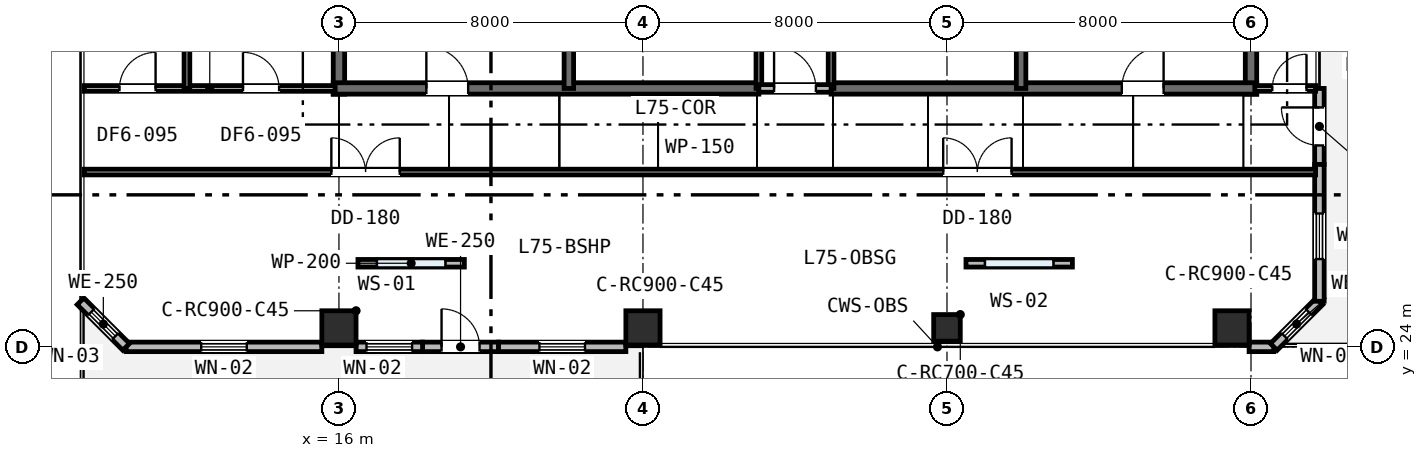
"""IFC4 building model, lengths in metres.
Left out: names, types, materials, properties, quantities, classifications, styles, units other than length and angle.
Written with IfcOpenShell. Run it as: python <this file> out.ifc"""

import sys

from ifc_helpers import new_model, si_unit, direction, frame, frame_2d, origin, origin_2d, place, context, subcontext, project, spatial, rectangle, extrude, element, fill, save


model = new_model("IFC4")
c1 = context("Model", 3, precision=1e-05, world=origin(), true_north=direction((0.0, 1.0)))
c2 = subcontext(c1, "Body", "Model", "MODEL_VIEW")
j1 = project(units=[si_unit("LENGTHUNIT", "METRE"), si_unit("PLANEANGLEUNIT", "RADIAN")], contexts=[c1])
p1 = place(None, origin())
s1 = spatial("IfcSite", under=j1, at=p1, CompositionType="ELEMENT")
p2 = place(p1, origin())
s2 = spatial("IfcBuilding", under=s1, at=p2, CompositionType="ELEMENT")
p3 = place(p2, frame((0.0, 0.0, 290.6)))
s3 = spatial("IfcBuildingStorey", under=s2, at=p3, CompositionType="ELEMENT", Elevation=290.6)
for number, where, z_axis, x_axis in (
    (1, (16.0, 30.65, 0.0), (0.0, 0.0, 1.0), (0.0, 1.0, 0.0)),
    (2, (40.0, 30.65, 0.0), (0.0, 0.0, 1.0), (0.0, 1.0, 0.0)),
):
    element("IfcWall", number, at=place(p3, frame(where, z_axis=z_axis, x_axis=x_axis)), inside=s3, PredefinedType="SHEAR", context=c2, shape_type="SweptSolid", body=[
        extrude(rectangle(XDim=12.3, YDim=0.3, at=frame_2d((6.15, 0.0))), origin(), (0.0, 0.0, 1.0), 5.2),
    ])
p4 = place(p3, frame((15.85, 30.8, 0.0), z_axis=(0.0, 0.0, 1.0), x_axis=(1.0, 0.0, 0.0)))
e3 = element("IfcWall", 3, at=p4, inside=s3, PredefinedType="SHEAR", context=c2, shape_type="SweptSolid", body=[
    extrude(rectangle(XDim=11.2, YDim=0.3, at=frame_2d((5.6, 0.0))), origin(), (0.0, 0.0, 1.0), 5.2),
])
p5 = place(p4, frame((2.45, 0.0, 0.0)))
e4 = element("IfcOpeningElement", 4, at=p5, cuts=e3, PredefinedType="OPENING", context=c2, shape_type="SweptSolid", body=[
    extrude(rectangle(XDim=1.1, YDim=2.15, at=frame_2d((0.55, 1.075))), frame((0.0, 0.16, 0.0), z_axis=(0.0, -1.0, 0.0), x_axis=(1.0, 0.0, 0.0)), (0.0, 0.0, 1.0), 0.32),
])
p6 = place(p3, frame((28.95, 30.8, 0.0), z_axis=(0.0, 0.0, 1.0), x_axis=(1.0, 0.0, 0.0)))
e5 = element("IfcWall", 5, at=p6, inside=s3, PredefinedType="SHEAR", context=c2, shape_type="SweptSolid", body=[
    extrude(rectangle(XDim=11.2, YDim=0.3, at=frame_2d((5.6, 0.0))), origin(), (0.0, 0.0, 1.0), 5.2),
])
p7 = place(p6, frame((7.65, 0.0, 0.0)))
e6 = element("IfcOpeningElement", 6, at=p7, cuts=e5, PredefinedType="OPENING", context=c2, shape_type="SweptSolid", body=[
    extrude(rectangle(XDim=1.1, YDim=2.15, at=frame_2d((0.55, 1.075))), frame((0.0, 0.16, 0.0), z_axis=(0.0, -1.0, 0.0), x_axis=(1.0, 0.0, 0.0)), (0.0, 0.0, 1.0), 0.32),
])
for number, where, z_axis, x_axis in (
    (7, (22.05, 30.8, 0.0), (0.0, 0.0, 1.0), (0.0, 1.0, 0.0)),
    (8, (33.95, 30.8, 0.0), (0.0, 0.0, 1.0), (0.0, 1.0, 0.0)),
):
    element("IfcWall", number, at=place(p3, frame(where, z_axis=z_axis, x_axis=x_axis)), inside=s3, PredefinedType="SHEAR", context=c2, shape_type="SweptSolid", body=[
        extrude(rectangle(XDim=6.45, YDim=0.25, at=frame_2d((3.225, 0.0))), origin(), (0.0, 0.0, 1.0), 5.2),
    ])
for number, where, z_axis, x_axis in (
    (9, (16.0, 24.5, 0.0), (0.0, 0.0, 1.0), (1.0, 0.0, 0.0)),
    (10, (24.0, 24.5, 0.0), (0.0, 0.0, 1.0), (1.0, 0.0, 0.0)),
):
    element("IfcColumn", number, at=place(p3, frame(where, z_axis=z_axis, x_axis=x_axis)), inside=s3, PredefinedType="COLUMN", context=c2, shape_type="SweptSolid", body=[
        extrude(rectangle(XDim=0.9, YDim=0.9, at=origin_2d()), origin(), (0.0, 0.0, 1.0), 5.2),
    ])
p8 = place(p3, frame((32.0, 24.5, 0.0), z_axis=(0.0, 0.0, 1.0), x_axis=(1.0, 0.0, 0.0)))
e11 = element("IfcColumn", 11, at=p8, inside=s3, PredefinedType="COLUMN", context=c2, shape_type="SweptSolid", body=[
    extrude(rectangle(XDim=0.7, YDim=0.7, at=origin_2d()), origin(), (0.0, 0.0, 1.0), 5.2),
])
p9 = place(p3, frame((39.5, 24.5, 0.0), z_axis=(0.0, 0.0, 1.0), x_axis=(1.0, 0.0, 0.0)))
e12 = element("IfcColumn", 12, at=p9, inside=s3, PredefinedType="COLUMN", context=c2, shape_type="SweptSolid", body=[
    extrude(rectangle(XDim=0.9, YDim=0.9, at=origin_2d()), origin(), (0.0, 0.0, 1.0), 5.2),
])
p10 = place(p3, frame((18.2, 24.0, 0.0), z_axis=(0.0, 0.0, 1.0), x_axis=(1.0, 0.0, 0.0)))
e13 = element("IfcWall", 13, at=p10, inside=s3, PredefinedType="STANDARD", context=c2, shape_type="SweptSolid", body=[
    extrude(rectangle(XDim=2.0, YDim=0.25, at=frame_2d((1.0, 0.0))), origin(), (0.0, 0.0, 1.0), 4.58),
])
p11 = place(p10, frame((0.5, 0.0, 0.0)))
e14 = element("IfcOpeningElement", 14, at=p11, cuts=e13, PredefinedType="OPENING", context=c2, shape_type="SweptSolid", body=[
    extrude(rectangle(XDim=1.0, YDim=2.15, at=frame_2d((0.5, 1.075))), frame((0.0, 0.135, 0.0), z_axis=(0.0, -1.0, 0.0), x_axis=(1.0, 0.0, 0.0)), (0.0, 0.0, 1.0), 0.27),
])
p12 = place(p3, frame((10.4, 24.0, 0.0), z_axis=(0.0, 0.0, 1.0), x_axis=(1.0, 0.0, 0.0)))
e15 = element("IfcWall", 15, at=p12, inside=s3, PredefinedType="STANDARD", context=c2, shape_type="SweptSolid", body=[
    extrude(rectangle(XDim=5.15, YDim=0.25, at=frame_2d((2.575, 0.0))), origin(), (0.0, 0.0, 1.0), 4.87),
])
p13 = place(p12, frame((1.975, 0.0, 0.85)))
e16 = element("IfcOpeningElement", 16, at=p13, cuts=e15, PredefinedType="OPENING", context=c2, shape_type="SweptSolid", body=[
    extrude(rectangle(XDim=1.2, YDim=1.6, at=frame_2d((0.6, 0.8))), frame((0.0, 0.135, 0.0), z_axis=(0.0, -1.0, 0.0), x_axis=(1.0, 0.0, 0.0)), (0.0, 0.0, 1.0), 0.27),
])
p14 = place(p3, frame((16.45, 24.0, 0.0), z_axis=(0.0, 0.0, 1.0), x_axis=(1.0, 0.0, 0.0)))
e17 = element("IfcWall", 17, at=p14, inside=s3, PredefinedType="STANDARD", context=c2, shape_type="SweptSolid", body=[
    extrude(rectangle(XDim=1.75, YDim=0.25, at=frame_2d((0.875, 0.0))), origin(), (0.0, 0.0, 1.0), 4.58),
])
p15 = place(p14, frame((0.275, 0.0, 0.85)))
e18 = element("IfcOpeningElement", 18, at=p15, cuts=e17, PredefinedType="OPENING", context=c2, shape_type="SweptSolid", body=[
    extrude(rectangle(XDim=1.2, YDim=1.6, at=frame_2d((0.6, 0.8))), frame((0.0, 0.135, 0.0), z_axis=(0.0, -1.0, 0.0), x_axis=(1.0, 0.0, 0.0)), (0.0, 0.0, 1.0), 0.27),
])
p16 = place(p3, frame((20.2, 24.0, 0.0), z_axis=(0.0, 0.0, 1.0), x_axis=(1.0, 0.0, 0.0)))
e19 = element("IfcWall", 19, at=p16, inside=s3, PredefinedType="STANDARD", context=c2, shape_type="SweptSolid", body=[
    extrude(rectangle(XDim=3.35, YDim=0.25, at=frame_2d((1.675, 0.0))), origin(), (0.0, 0.0, 1.0), 4.58),
])
p17 = place(p16, frame((1.075, 0.0, 0.85)))
e20 = element("IfcOpeningElement", 20, at=p17, cuts=e19, PredefinedType="OPENING", context=c2, shape_type="SweptSolid", body=[
    extrude(rectangle(XDim=1.2, YDim=1.6, at=frame_2d((0.6, 0.8))), frame((0.0, 0.135, 0.0), z_axis=(0.0, -1.0, 0.0), x_axis=(1.0, 0.0, 0.0)), (0.0, 0.0, 1.0), 0.27),
])
p18 = place(p3, frame((39.95, 24.0, 0.0), z_axis=(0.0, 0.0, 1.0), x_axis=(1.0, 0.0, 0.0)))
e21 = element("IfcWall", 21, at=p18, inside=s3, PredefinedType="STANDARD", context=c2, shape_type="SweptSolid", body=[
    extrude(rectangle(XDim=0.65, YDim=0.25, at=frame_2d((0.325, 0.0))), origin(), (0.0, 0.0, 1.0), 4.87),
])
p19 = place(p3, frame((40.6, 24.0, 0.0), z_axis=(0.0, 0.0, 1.0), x_axis=(0.707106781187, 0.707106781187, 0.0)))
e22 = element("IfcWall", 22, at=p19, inside=s3, PredefinedType="STANDARD", context=c2, shape_type="SweptSolid", body=[
    extrude(rectangle(XDim=1.697, YDim=0.25, at=frame_2d((0.849, 0.0))), origin(), (0.0, 0.0, 1.0), 4.87),
])
p20 = place(p19, frame((0.399, 0.0, 0.9)))
e23 = element("IfcOpeningElement", 23, at=p20, cuts=e22, PredefinedType="OPENING", context=c2, shape_type="SweptSolid", body=[
    extrude(rectangle(XDim=0.9, YDim=1.55, at=frame_2d((0.45, 0.775))), frame((0.0, 0.135, 0.0), z_axis=(0.0, -1.0, 0.0), x_axis=(1.0, 0.0, 0.0)), (0.0, 0.0, 1.0), 0.27),
])
p21 = place(p3, frame((41.8, 28.8, 0.0), z_axis=(0.0, 0.0, 1.0), x_axis=(0.0, 1.0, 0.0)))
e24 = element("IfcWall", 24, at=p21, inside=s3, PredefinedType="STANDARD", context=c2, shape_type="SweptSolid", body=[
    extrude(rectangle(XDim=2.0, YDim=0.25, at=frame_2d((1.0, 0.0))), origin(), (0.0, 0.0, 1.0), 4.87),
])
p22 = place(p21, frame((0.5, 0.0, 0.0)))
e25 = element("IfcOpeningElement", 25, at=p22, cuts=e24, PredefinedType="OPENING", context=c2, shape_type="SweptSolid", body=[
    extrude(rectangle(XDim=1.0, YDim=2.15, at=frame_2d((0.5, 1.075))), frame((0.0, 0.135, 0.0), z_axis=(0.0, -1.0, 0.0), x_axis=(1.0, 0.0, 0.0)), (0.0, 0.0, 1.0), 0.27),
])
p23 = place(p3, frame((41.8, 25.2, 0.0), z_axis=(0.0, 0.0, 1.0), x_axis=(0.0, 1.0, 0.0)))
e26 = element("IfcWall", 26, at=p23, inside=s3, PredefinedType="STANDARD", context=c2, shape_type="SweptSolid", body=[
    extrude(rectangle(XDim=3.6, YDim=0.25, at=frame_2d((1.8, 0.0))), origin(), (0.0, 0.0, 1.0), 4.87),
])
p24 = place(p23, frame((1.11, 0.0, 0.85)))
e27 = element("IfcOpeningElement", 27, at=p24, cuts=e26, PredefinedType="OPENING", context=c2, shape_type="SweptSolid", body=[
    extrude(rectangle(XDim=1.2, YDim=1.6, at=frame_2d((0.6, 0.8))), frame((0.0, 0.135, 0.0), z_axis=(0.0, -1.0, 0.0), x_axis=(1.0, 0.0, 0.0)), (0.0, 0.0, 1.0), 0.27),
])
p25 = place(p3, frame((9.2, 25.2, 0.0), z_axis=(0.0, 0.0, 1.0), x_axis=(0.707106781187, -0.707106781187, 0.0)))
e28 = element("IfcWall", 28, at=p25, inside=s3, PredefinedType="STANDARD", context=c2, shape_type="SweptSolid", body=[
    extrude(rectangle(XDim=1.697, YDim=0.25, at=frame_2d((0.849, 0.0))), origin(), (0.0, 0.0, 1.0), 4.87),
])
p26 = place(p25, frame((0.399, 0.0, 0.9)))
e29 = element("IfcOpeningElement", 29, at=p26, cuts=e28, PredefinedType="OPENING", context=c2, shape_type="SweptSolid", body=[
    extrude(rectangle(XDim=0.9, YDim=1.55, at=frame_2d((0.45, 0.775))), frame((0.0, 0.135, 0.0), z_axis=(0.0, -1.0, 0.0), x_axis=(1.0, 0.0, 0.0)), (0.0, 0.0, 1.0), 0.27),
])
p27 = place(p3, frame((16.5, 26.2, 0.0), z_axis=(0.0, 0.0, 1.0), x_axis=(1.0, 0.0, 0.0)))
e30 = element("IfcWall", 30, at=p27, inside=s3, PredefinedType="PARAPET", context=c2, shape_type="SweptSolid", body=[
    extrude(rectangle(XDim=2.8, YDim=0.2, at=frame_2d((1.4, 0.0))), origin(), (0.0, 0.0, 1.0), 2.4),
])
p28 = place(p27, frame((0.5, 0.0, 0.4)))
e31 = element("IfcOpeningElement", 31, at=p28, cuts=e30, PredefinedType="OPENING", context=c2, shape_type="SweptSolid", body=[
    extrude(rectangle(XDim=1.8, YDim=1.8, at=frame_2d((0.9, 0.9))), frame((0.0, 0.11, 0.0), z_axis=(0.0, -1.0, 0.0), x_axis=(1.0, 0.0, 0.0)), (0.0, 0.0, 1.0), 0.22),
])
p29 = place(p3, frame((32.5, 26.2, 0.0), z_axis=(0.0, 0.0, 1.0), x_axis=(1.0, 0.0, 0.0)))
e32 = element("IfcWall", 32, at=p29, inside=s3, PredefinedType="PARAPET", context=c2, shape_type="SweptSolid", body=[
    extrude(rectangle(XDim=2.8, YDim=0.2, at=frame_2d((1.4, 0.0))), origin(), (0.0, 0.0, 1.0), 2.4),
])
p30 = place(p29, frame((0.5, 0.0, 0.4)))
e33 = element("IfcOpeningElement", 33, at=p30, cuts=e32, PredefinedType="OPENING", context=c2, shape_type="SweptSolid", body=[
    extrude(rectangle(XDim=1.8, YDim=1.8, at=frame_2d((0.9, 0.9))), frame((0.0, 0.11, 0.0), z_axis=(0.0, -1.0, 0.0), x_axis=(1.0, 0.0, 0.0)), (0.0, 0.0, 1.0), 0.22),
])
for number, where, z_axis, x_axis in (
    (34, (27.05, 30.8, 0.0), (0.0, 0.0, 1.0), (0.0, 1.0, 0.0)),
    (35, (28.95, 30.8, 0.0), (0.0, 0.0, 1.0), (0.0, 1.0, 0.0)),
):
    element("IfcWall", number, at=place(p3, frame(where, z_axis=z_axis, x_axis=x_axis)), inside=s3, PredefinedType="PLUMBINGWALL", context=c2, shape_type="SweptSolid", body=[
        extrude(rectangle(XDim=3.45, YDim=0.15, at=frame_2d((1.725, 0.0))), origin(), (0.0, 0.0, 1.0), 4.67),
    ])
p31 = place(p3, frame((27.05, 30.8, 0.0), z_axis=(0.0, 0.0, 1.0), x_axis=(1.0, 0.0, 0.0)))
e36 = element("IfcWall", 36, at=p31, inside=s3, PredefinedType="PARTITIONING", context=c2, shape_type="SweptSolid", body=[
    extrude(rectangle(XDim=1.9, YDim=0.2, at=frame_2d((0.95, 0.0))), origin(), (0.0, 0.0, 1.0), 4.67),
])
p32 = place(p31, frame((0.4, 0.0, 0.0)))
e37 = element("IfcOpeningElement", 37, at=p32, cuts=e36, PredefinedType="OPENING", context=c2, shape_type="SweptSolid", body=[
    extrude(rectangle(XDim=1.1, YDim=2.15, at=frame_2d((0.55, 1.075))), frame((0.0, 0.11, 0.0), z_axis=(0.0, -1.0, 0.0), x_axis=(1.0, 0.0, 0.0)), (0.0, 0.0, 1.0), 0.22),
])
p33 = place(p3, frame((40.1, 30.8, 0.0), z_axis=(0.0, 0.0, 1.0), x_axis=(1.0, 0.0, 0.0)))
e38 = element("IfcWall", 38, at=p33, inside=s3, PredefinedType="PARTITIONING", context=c2, shape_type="SweptSolid", body=[
    extrude(rectangle(XDim=1.6, YDim=0.15, at=frame_2d((0.8, 0.0))), origin(), (0.0, 0.0, 1.0), 4.87),
])
p34 = place(p33, frame((0.46, 0.0, 0.0)))
e39 = element("IfcOpeningElement", 39, at=p34, cuts=e38, PredefinedType="OPENING", context=c2, shape_type="SweptSolid", body=[
    extrude(rectangle(XDim=0.9, YDim=2.15, at=frame_2d((0.45, 1.075))), frame((0.0, 0.085, 0.0), z_axis=(0.0, -1.0, 0.0), x_axis=(1.0, 0.0, 0.0)), (0.0, 0.0, 1.0), 0.17),
])
p35 = place(p3, frame((9.3, 28.6, 0.0), z_axis=(0.0, 0.0, 1.0), x_axis=(1.0, 0.0, 0.0)))
e40 = element("IfcWall", 40, at=p35, inside=s3, PredefinedType="PARTITIONING", context=c2, shape_type="SweptSolid", body=[
    extrude(rectangle(XDim=32.4, YDim=0.15, at=frame_2d((16.2, 0.0))), origin(), (0.0, 0.0, 1.0), 4.58),
])
p36 = place(p35, frame((22.6, 0.0, 0.0)))
e41 = element("IfcOpeningElement", 41, at=p36, cuts=e40, PredefinedType="OPENING", context=c2, shape_type="SweptSolid", body=[
    extrude(rectangle(XDim=1.8, YDim=2.15, at=frame_2d((0.9, 1.075))), frame((0.0, 0.085, 0.0), z_axis=(0.0, -1.0, 0.0), x_axis=(1.0, 0.0, 0.0)), (0.0, 0.0, 1.0), 0.17),
])
p37 = place(p35, frame((6.5, 0.0, 0.0)))
e42 = element("IfcOpeningElement", 42, at=p37, cuts=e40, PredefinedType="OPENING", context=c2, shape_type="SweptSolid", body=[
    extrude(rectangle(XDim=1.8, YDim=2.15, at=frame_2d((0.9, 1.075))), frame((0.0, 0.085, 0.0), z_axis=(0.0, -1.0, 0.0), x_axis=(1.0, 0.0, 0.0)), (0.0, 0.0, 1.0), 0.17),
])
p38 = place(p3, frame((9.3, 30.8, 0.0), z_axis=(0.0, 0.0, 1.0), x_axis=(1.0, 0.0, 0.0)))
e43 = element("IfcWall", 43, at=p38, inside=s3, PredefinedType="PARTITIONING", context=c2, shape_type="SweptSolid", body=[
    extrude(rectangle(XDim=6.6, YDim=0.15, at=frame_2d((3.3, 0.0))), origin(), (0.0, 0.0, 1.0), 4.58),
])
p39 = place(p38, frame((0.925, 0.0, 0.0)))
e44 = element("IfcOpeningElement", 44, at=p39, cuts=e43, PredefinedType="OPENING", context=c2, shape_type="SweptSolid", body=[
    extrude(rectangle(XDim=0.95, YDim=2.15, at=frame_2d((0.475, 1.075))), frame((0.0, 0.085, 0.0), z_axis=(0.0, -1.0, 0.0), x_axis=(1.0, 0.0, 0.0)), (0.0, 0.0, 1.0), 0.17),
])
p40 = place(p38, frame((4.175, 0.0, 0.0)))
e45 = element("IfcOpeningElement", 45, at=p40, cuts=e43, PredefinedType="OPENING", context=c2, shape_type="SweptSolid", body=[
    extrude(rectangle(XDim=0.95, YDim=2.15, at=frame_2d((0.475, 1.075))), frame((0.0, 0.085, 0.0), z_axis=(0.0, -1.0, 0.0), x_axis=(1.0, 0.0, 0.0)), (0.0, 0.0, 1.0), 0.17),
])
p41 = place(p3, frame((12.0, 30.8, 0.0), z_axis=(0.0, 0.0, 1.0), x_axis=(0.0, 1.0, 0.0)))
e46 = element("IfcWall", 46, at=p41, inside=s3, PredefinedType="PARTITIONING", context=c2, shape_type="SweptSolid", body=[
    extrude(rectangle(XDim=12.1, YDim=0.15, at=frame_2d((6.05, 0.0))), origin(), (0.0, 0.0, 1.0), 4.87),
])
p42 = place(p11, origin())
e47 = element("IfcDoor", 47, at=p42, inside=s3, OperationType="SINGLE_SWING_LEFT", PredefinedType="DOOR", context=c2, shape_type="SweptSolid", body=[
    extrude(rectangle(XDim=1.0, YDim=2.15, at=frame_2d((0.5, 1.075))), frame((0.0, 0.025, 0.0), z_axis=(0.0, -1.0, 0.0), x_axis=(1.0, 0.0, 0.0)), (0.0, 0.0, 1.0), 0.05),
])
fill(e14, e47)
p43 = place(p13, origin())
e48 = element("IfcWindow", 48, at=p43, inside=s3, PartitioningType="SINGLE_PANEL", PredefinedType="WINDOW", context=c2, shape_type="SweptSolid", body=[
    extrude(rectangle(XDim=1.2, YDim=1.6, at=frame_2d((0.6, 0.8))), frame((0.0, 0.03, 0.0), z_axis=(0.0, -1.0, 0.0), x_axis=(1.0, 0.0, 0.0)), (0.0, 0.0, 1.0), 0.06),
])
fill(e16, e48)
p44 = place(p15, origin())
e49 = element("IfcWindow", 49, at=p44, inside=s3, PartitioningType="SINGLE_PANEL", PredefinedType="WINDOW", context=c2, shape_type="SweptSolid", body=[
    extrude(rectangle(XDim=1.2, YDim=1.6, at=frame_2d((0.6, 0.8))), frame((0.0, 0.03, 0.0), z_axis=(0.0, -1.0, 0.0), x_axis=(1.0, 0.0, 0.0)), (0.0, 0.0, 1.0), 0.06),
])
fill(e18, e49)
p45 = place(p17, origin())
e50 = element("IfcWindow", 50, at=p45, inside=s3, PartitioningType="SINGLE_PANEL", PredefinedType="WINDOW", context=c2, shape_type="SweptSolid", body=[
    extrude(rectangle(XDim=1.2, YDim=1.6, at=frame_2d((0.6, 0.8))), frame((0.0, 0.03, 0.0), z_axis=(0.0, -1.0, 0.0), x_axis=(1.0, 0.0, 0.0)), (0.0, 0.0, 1.0), 0.06),
])
fill(e20, e50)
p46 = place(p20, origin())
e51 = element("IfcWindow", 51, at=p46, inside=s3, PartitioningType="SINGLE_PANEL", PredefinedType="WINDOW", context=c2, shape_type="SweptSolid", body=[
    extrude(rectangle(XDim=0.9, YDim=1.55, at=frame_2d((0.45, 0.775))), frame((0.0, 0.03, 0.0), z_axis=(0.0, -1.0, 0.0), x_axis=(1.0, 0.0, 0.0)), (0.0, 0.0, 1.0), 0.06),
])
fill(e23, e51)
p47 = place(p22, origin())
e52 = element("IfcDoor", 52, at=p47, inside=s3, OperationType="SINGLE_SWING_RIGHT", PredefinedType="DOOR", context=c2, shape_type="SweptSolid", body=[
    extrude(rectangle(XDim=1.0, YDim=2.15, at=frame_2d((0.5, 1.075))), frame((0.0, 0.025, 0.0), z_axis=(0.0, -1.0, 0.0), x_axis=(1.0, 0.0, 0.0)), (0.0, 0.0, 1.0), 0.05),
])
fill(e25, e52)
p48 = place(p24, origin())
e53 = element("IfcWindow", 53, at=p48, inside=s3, PartitioningType="SINGLE_PANEL", PredefinedType="WINDOW", context=c2, shape_type="SweptSolid", body=[
    extrude(rectangle(XDim=1.2, YDim=1.6, at=frame_2d((0.6, 0.8))), frame((0.0, 0.03, 0.0), z_axis=(0.0, -1.0, 0.0), x_axis=(1.0, 0.0, 0.0)), (0.0, 0.0, 1.0), 0.06),
])
fill(e27, e53)
p49 = place(p26, origin())
e54 = element("IfcWindow", 54, at=p49, inside=s3, PartitioningType="SINGLE_PANEL", PredefinedType="WINDOW", context=c2, shape_type="SweptSolid", body=[
    extrude(rectangle(XDim=0.9, YDim=1.55, at=frame_2d((0.45, 0.775))), frame((0.0, 0.03, 0.0), z_axis=(0.0, -1.0, 0.0), x_axis=(1.0, 0.0, 0.0)), (0.0, 0.0, 1.0), 0.06),
])
fill(e29, e54)
p50 = place(p28, origin())
e55 = element("IfcWindow", 55, at=p50, inside=s3, PartitioningType="SINGLE_PANEL", PredefinedType="SKYLIGHT", context=c2, shape_type="SweptSolid", body=[
    extrude(rectangle(XDim=1.8, YDim=1.8, at=frame_2d((0.9, 0.9))), frame((0.0, 0.03, 0.0), z_axis=(0.0, -1.0, 0.0), x_axis=(1.0, 0.0, 0.0)), (0.0, 0.0, 1.0), 0.06),
])
fill(e31, e55)
p51 = place(p30, origin())
e56 = element("IfcWindow", 56, at=p51, inside=s3, PartitioningType="SINGLE_PANEL", PredefinedType="SKYLIGHT", context=c2, shape_type="SweptSolid", body=[
    extrude(rectangle(XDim=1.8, YDim=1.8, at=frame_2d((0.9, 0.9))), frame((0.0, 0.03, 0.0), z_axis=(0.0, -1.0, 0.0), x_axis=(1.0, 0.0, 0.0)), (0.0, 0.0, 1.0), 0.06),
])
fill(e33, e56)
p52 = place(p32, origin())
e57 = element("IfcDoor", 57, at=p52, inside=s3, OperationType="SINGLE_SWING_LEFT", PredefinedType="DOOR", context=c2, shape_type="SweptSolid", body=[
    extrude(rectangle(XDim=1.1, YDim=2.15, at=frame_2d((0.55, 1.075))), frame((0.0, 0.025, 0.0), z_axis=(0.0, -1.0, 0.0), x_axis=(1.0, 0.0, 0.0)), (0.0, 0.0, 1.0), 0.05),
])
fill(e37, e57)
p53 = place(p5, origin())
e58 = element("IfcDoor", 58, at=p53, inside=s3, OperationType="SINGLE_SWING_LEFT", PredefinedType="DOOR", context=c2, shape_type="SweptSolid", body=[
    extrude(rectangle(XDim=1.1, YDim=2.15, at=frame_2d((0.55, 1.075))), frame((0.0, 0.025, 0.0), z_axis=(0.0, -1.0, 0.0), x_axis=(1.0, 0.0, 0.0)), (0.0, 0.0, 1.0), 0.05),
])
fill(e4, e58)
p54 = place(p7, origin())
e59 = element("IfcDoor", 59, at=p54, inside=s3, OperationType="SINGLE_SWING_RIGHT", PredefinedType="DOOR", context=c2, shape_type="SweptSolid", body=[
    extrude(rectangle(XDim=1.1, YDim=2.15, at=frame_2d((0.55, 1.075))), frame((0.0, 0.025, 0.0), z_axis=(0.0, -1.0, 0.0), x_axis=(1.0, 0.0, 0.0)), (0.0, 0.0, 1.0), 0.05),
])
fill(e6, e59)
p55 = place(p34, origin())
e60 = element("IfcDoor", 60, at=p55, inside=s3, OperationType="SINGLE_SWING_RIGHT", PredefinedType="DOOR", context=c2, shape_type="SweptSolid", body=[
    extrude(rectangle(XDim=0.9, YDim=2.15, at=frame_2d((0.45, 1.075))), frame((0.0, 0.025, 0.0), z_axis=(0.0, -1.0, 0.0), x_axis=(1.0, 0.0, 0.0)), (0.0, 0.0, 1.0), 0.05),
])
fill(e39, e60)
p56 = place(p36, origin())
e61 = element("IfcDoor", 61, at=p56, inside=s3, OperationType="DOUBLE_DOOR_SINGLE_SWING", PredefinedType="DOOR", context=c2, shape_type="SweptSolid", body=[
    extrude(rectangle(XDim=1.8, YDim=2.15, at=frame_2d((0.9, 1.075))), frame((0.0, 0.025, 0.0), z_axis=(0.0, -1.0, 0.0), x_axis=(1.0, 0.0, 0.0)), (0.0, 0.0, 1.0), 0.05),
])
fill(e41, e61)
p57 = place(p37, origin())
e62 = element("IfcDoor", 62, at=p57, inside=s3, OperationType="DOUBLE_DOOR_SINGLE_SWING", PredefinedType="DOOR", context=c2, shape_type="SweptSolid", body=[
    extrude(rectangle(XDim=1.8, YDim=2.15, at=frame_2d((0.9, 1.075))), frame((0.0, 0.025, 0.0), z_axis=(0.0, -1.0, 0.0), x_axis=(1.0, 0.0, 0.0)), (0.0, 0.0, 1.0), 0.05),
])
fill(e42, e62)
p58 = place(p39, origin())
e63 = element("IfcDoor", 63, at=p58, inside=s3, OperationType="SINGLE_SWING_RIGHT", PredefinedType="DOOR", context=c2, shape_type="SweptSolid", body=[
    extrude(rectangle(XDim=0.95, YDim=2.15, at=frame_2d((0.475, 1.075))), frame((0.0, 0.025, 0.0), z_axis=(0.0, -1.0, 0.0), x_axis=(1.0, 0.0, 0.0)), (0.0, 0.0, 1.0), 0.05),
])
fill(e44, e63)
p59 = place(p40, origin())
e64 = element("IfcDoor", 64, at=p59, inside=s3, OperationType="SINGLE_SWING_LEFT", PredefinedType="DOOR", context=c2, shape_type="SweptSolid", body=[
    extrude(rectangle(XDim=0.95, YDim=2.15, at=frame_2d((0.475, 1.075))), frame((0.0, 0.025, 0.0), z_axis=(0.0, -1.0, 0.0), x_axis=(1.0, 0.0, 0.0)), (0.0, 0.0, 1.0), 0.05),
])
fill(e45, e64)
save(model, sys.argv[1])
